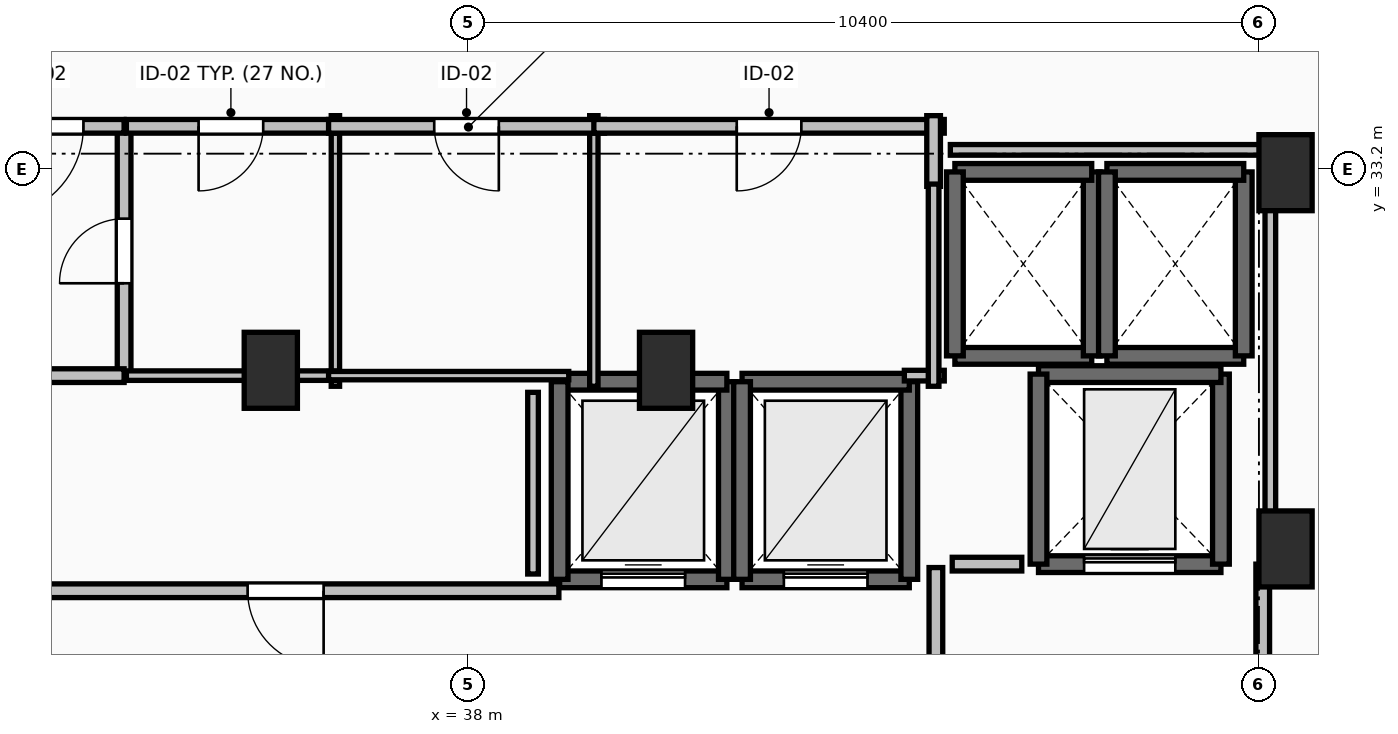
"""IFC4 building model, lengths in metres.
Left out: names, types, materials, properties, quantities, classifications, styles, units other than length and angle.
Written with IfcOpenShell. Run it as: python <this file> out.ifc"""

import sys

from ifc_helpers import new_model, si_unit, direction, frame, frame_2d, origin, origin_2d, place, context, subcontext, project, spatial, rectangle, extrude, element, fill, save


model = new_model("IFC4")
c1 = context("Model", 3, precision=1e-05, world=origin(), true_north=direction((0.0, 1.0)))
c2 = subcontext(c1, "Body", "Model", "MODEL_VIEW")
j1 = project(units=[si_unit("LENGTHUNIT", "METRE"), si_unit("PLANEANGLEUNIT", "RADIAN")], contexts=[c1])
p1 = place(None, origin())
s1 = spatial("IfcSite", under=j1, at=p1, CompositionType="ELEMENT")
p2 = place(p1, origin())
s2 = spatial("IfcBuilding", under=s1, at=p2, CompositionType="ELEMENT")
p3 = place(p2, frame((0.0, 0.0, 255.55)))
s3 = spatial("IfcBuildingStorey", under=s2, at=p3, CompositionType="ELEMENT", Elevation=255.55)
for number, where, z_axis, x_axis in (
    (1, (48.75, 33.15, 0.0), (0.0, 0.0, 1.0), (1.0, 0.0, 0.0)),
    (2, (48.75, 28.2, 0.0), (0.0, 0.0, 1.0), (1.0, 0.0, 0.0)),
    (3, (35.4, 30.55, 0.0), (0.0, 0.0, 1.0), (1.0, 0.0, 0.0)),
    (4, (40.6, 30.55, 0.0), (0.0, 0.0, 1.0), (1.0, 0.0, 0.0)),
):
    element("IfcColumn", number, at=place(p3, frame(where, z_axis=z_axis, x_axis=x_axis)), inside=s3, PredefinedType="PILASTER", context=c2, shape_type="SweptSolid", body=[
        extrude(rectangle(XDim=0.7, YDim=1.0, at=origin_2d()), origin(), (0.0, 0.0, 1.0), 3.55),
    ])
p4 = place(p3, frame((39.2, 27.8, 0.0), z_axis=(0.0, 0.0, 1.0), x_axis=(1.0, 0.0, 0.0)))
e5 = element("IfcWall", 5, at=p4, inside=s3, PredefinedType="SOLIDWALL", context=c2, shape_type="SweptSolid", body=[
    extrude(rectangle(XDim=2.2, YDim=0.22, at=frame_2d((1.1, 0.0))), origin(), (0.0, 0.0, 1.0), 3.29),
])
p5 = place(p4, frame((0.55, 0.0, 0.0)))
e6 = element("IfcOpeningElement", 6, at=p5, cuts=e5, PredefinedType="OPENING", context=c2, shape_type="SweptSolid", body=[
    extrude(rectangle(XDim=1.1, YDim=2.2, at=frame_2d((0.55, 1.1))), frame((0.0, 0.125, 0.0), z_axis=(0.0, -1.0, 0.0), x_axis=(1.0, 0.0, 0.0)), (0.0, 0.0, 1.0), 0.25),
])
p6 = place(p3, frame((41.4, 27.8, 0.0), z_axis=(0.0, 0.0, 1.0), x_axis=(0.0, 1.0, 0.0)))
e7 = element("IfcWall", 7, at=p6, inside=s3, PredefinedType="SOLIDWALL", context=c2, shape_type="SweptSolid", body=[
    extrude(rectangle(XDim=2.6, YDim=0.22, at=frame_2d((1.3, 0.0))), origin(), (0.0, 0.0, 1.0), 3.29),
])
p7 = place(p3, frame((41.4, 30.4, 0.0), z_axis=(0.0, 0.0, 1.0), x_axis=(-1.0, 0.0, 0.0)))
e8 = element("IfcWall", 8, at=p7, inside=s3, PredefinedType="SOLIDWALL", context=c2, shape_type="SweptSolid", body=[
    extrude(rectangle(XDim=2.2, YDim=0.22, at=frame_2d((1.1, 0.0))), origin(), (0.0, 0.0, 1.0), 3.29),
])
p8 = place(p3, frame((39.2, 30.4, 0.0), z_axis=(0.0, 0.0, 1.0), x_axis=(0.0, -1.0, 0.0)))
e9 = element("IfcWall", 9, at=p8, inside=s3, PredefinedType="SOLIDWALL", context=c2, shape_type="SweptSolid", body=[
    extrude(rectangle(XDim=2.6, YDim=0.22, at=frame_2d((1.3, 0.0))), origin(), (0.0, 0.0, 1.0), 3.29),
])
p9 = place(p3, frame((41.6, 27.8, 0.0), z_axis=(0.0, 0.0, 1.0), x_axis=(1.0, 0.0, 0.0)))
e10 = element("IfcWall", 10, at=p9, inside=s3, PredefinedType="SOLIDWALL", context=c2, shape_type="SweptSolid", body=[
    extrude(rectangle(XDim=2.2, YDim=0.22, at=frame_2d((1.1, 0.0))), origin(), (0.0, 0.0, 1.0), 3.29),
])
p10 = place(p9, frame((0.55, 0.0, 0.0)))
e11 = element("IfcOpeningElement", 11, at=p10, cuts=e10, PredefinedType="OPENING", context=c2, shape_type="SweptSolid", body=[
    extrude(rectangle(XDim=1.1, YDim=2.2, at=frame_2d((0.55, 1.1))), frame((0.0, 0.125, 0.0), z_axis=(0.0, -1.0, 0.0), x_axis=(1.0, 0.0, 0.0)), (0.0, 0.0, 1.0), 0.25),
])
p11 = place(p3, frame((43.8, 27.8, 0.0), z_axis=(0.0, 0.0, 1.0), x_axis=(0.0, 1.0, 0.0)))
e12 = element("IfcWall", 12, at=p11, inside=s3, PredefinedType="SOLIDWALL", context=c2, shape_type="SweptSolid", body=[
    extrude(rectangle(XDim=2.6, YDim=0.22, at=frame_2d((1.3, 0.0))), origin(), (0.0, 0.0, 1.0), 3.29),
])
p12 = place(p3, frame((43.8, 30.4, 0.0), z_axis=(0.0, 0.0, 1.0), x_axis=(-1.0, 0.0, 0.0)))
e13 = element("IfcWall", 13, at=p12, inside=s3, PredefinedType="SOLIDWALL", context=c2, shape_type="SweptSolid", body=[
    extrude(rectangle(XDim=2.2, YDim=0.22, at=frame_2d((1.1, 0.0))), origin(), (0.0, 0.0, 1.0), 3.29),
])
p13 = place(p3, frame((41.6, 30.4, 0.0), z_axis=(0.0, 0.0, 1.0), x_axis=(0.0, -1.0, 0.0)))
e14 = element("IfcWall", 14, at=p13, inside=s3, PredefinedType="SOLIDWALL", context=c2, shape_type="SweptSolid", body=[
    extrude(rectangle(XDim=2.6, YDim=0.22, at=frame_2d((1.3, 0.0))), origin(), (0.0, 0.0, 1.0), 3.29),
])
p14 = place(p3, frame((44.4, 30.74, 0.0), z_axis=(0.0, 0.0, 1.0), x_axis=(1.0, 0.0, 0.0)))
e15 = element("IfcWall", 15, at=p14, inside=s3, PredefinedType="SOLIDWALL", context=c2, shape_type="SweptSolid", body=[
    extrude(rectangle(XDim=1.8, YDim=0.22, at=frame_2d((0.9, 0.0))), origin(), (0.0, 0.0, 1.0), 3.29),
])
p15 = place(p3, frame((46.2, 30.74, 0.0), z_axis=(0.0, 0.0, 1.0), x_axis=(0.0, 1.0, 0.0)))
e16 = element("IfcWall", 16, at=p15, inside=s3, PredefinedType="SOLIDWALL", context=c2, shape_type="SweptSolid", body=[
    extrude(rectangle(XDim=2.42, YDim=0.22, at=frame_2d((1.21, 0.0))), origin(), (0.0, 0.0, 1.0), 3.29),
])
p16 = place(p3, frame((46.2, 33.16, 0.0), z_axis=(0.0, 0.0, 1.0), x_axis=(-1.0, 0.0, 0.0)))
e17 = element("IfcWall", 17, at=p16, inside=s3, PredefinedType="SOLIDWALL", context=c2, shape_type="SweptSolid", body=[
    extrude(rectangle(XDim=1.8, YDim=0.22, at=frame_2d((0.9, 0.0))), origin(), (0.0, 0.0, 1.0), 3.29),
])
p17 = place(p3, frame((44.4, 33.16, 0.0), z_axis=(0.0, 0.0, 1.0), x_axis=(0.0, -1.0, 0.0)))
e18 = element("IfcWall", 18, at=p17, inside=s3, PredefinedType="SOLIDWALL", context=c2, shape_type="SweptSolid", body=[
    extrude(rectangle(XDim=2.42, YDim=0.22, at=frame_2d((1.21, 0.0))), origin(), (0.0, 0.0, 1.0), 3.29),
])
p18 = place(p3, frame((46.4, 30.74, 0.0), z_axis=(0.0, 0.0, 1.0), x_axis=(1.0, 0.0, 0.0)))
e19 = element("IfcWall", 19, at=p18, inside=s3, PredefinedType="SOLIDWALL", context=c2, shape_type="SweptSolid", body=[
    extrude(rectangle(XDim=1.8, YDim=0.22, at=frame_2d((0.9, 0.0))), origin(), (0.0, 0.0, 1.0), 3.29),
])
p19 = place(p3, frame((48.2, 30.74, 0.0), z_axis=(0.0, 0.0, 1.0), x_axis=(0.0, 1.0, 0.0)))
e20 = element("IfcWall", 20, at=p19, inside=s3, PredefinedType="SOLIDWALL", context=c2, shape_type="SweptSolid", body=[
    extrude(rectangle(XDim=2.42, YDim=0.22, at=frame_2d((1.21, 0.0))), origin(), (0.0, 0.0, 1.0), 3.29),
])
p20 = place(p3, frame((48.2, 33.16, 0.0), z_axis=(0.0, 0.0, 1.0), x_axis=(-1.0, 0.0, 0.0)))
e21 = element("IfcWall", 21, at=p20, inside=s3, PredefinedType="SOLIDWALL", context=c2, shape_type="SweptSolid", body=[
    extrude(rectangle(XDim=1.8, YDim=0.22, at=frame_2d((0.9, 0.0))), origin(), (0.0, 0.0, 1.0), 3.29),
])
p21 = place(p3, frame((46.4, 33.16, 0.0), z_axis=(0.0, 0.0, 1.0), x_axis=(0.0, -1.0, 0.0)))
e22 = element("IfcWall", 22, at=p21, inside=s3, PredefinedType="SOLIDWALL", context=c2, shape_type="SweptSolid", body=[
    extrude(rectangle(XDim=2.42, YDim=0.22, at=frame_2d((1.21, 0.0))), origin(), (0.0, 0.0, 1.0), 3.29),
])
p22 = place(p3, frame((45.5, 28.0, 0.0), z_axis=(0.0, 0.0, 1.0), x_axis=(1.0, 0.0, 0.0)))
e23 = element("IfcWall", 23, at=p22, inside=s3, PredefinedType="SHEAR", context=c2, shape_type="SweptSolid", body=[
    extrude(rectangle(XDim=2.4, YDim=0.22, at=frame_2d((1.2, 0.0))), origin(), (0.0, 0.0, 1.0), 3.29),
])
p23 = place(p22, frame((0.6, 0.0, 0.0)))
e24 = element("IfcOpeningElement", 24, at=p23, cuts=e23, PredefinedType="OPENING", context=c2, shape_type="SweptSolid", body=[
    extrude(rectangle(XDim=1.2, YDim=2.2, at=frame_2d((0.6, 1.1))), frame((0.0, 0.125, 0.0), z_axis=(0.0, -1.0, 0.0), x_axis=(1.0, 0.0, 0.0)), (0.0, 0.0, 1.0), 0.25),
])
p24 = place(p3, frame((47.9, 28.0, 0.0), z_axis=(0.0, 0.0, 1.0), x_axis=(0.0, 1.0, 0.0)))
e25 = element("IfcWall", 25, at=p24, inside=s3, PredefinedType="SHEAR", context=c2, shape_type="SweptSolid", body=[
    extrude(rectangle(XDim=2.5, YDim=0.22, at=frame_2d((1.25, 0.0))), origin(), (0.0, 0.0, 1.0), 3.29),
])
p25 = place(p3, frame((47.9, 30.5, 0.0), z_axis=(0.0, 0.0, 1.0), x_axis=(-1.0, 0.0, 0.0)))
e26 = element("IfcWall", 26, at=p25, inside=s3, PredefinedType="SHEAR", context=c2, shape_type="SweptSolid", body=[
    extrude(rectangle(XDim=2.4, YDim=0.22, at=frame_2d((1.2, 0.0))), origin(), (0.0, 0.0, 1.0), 3.29),
])
p26 = place(p3, frame((45.5, 30.5, 0.0), z_axis=(0.0, 0.0, 1.0), x_axis=(0.0, -1.0, 0.0)))
e27 = element("IfcWall", 27, at=p26, inside=s3, PredefinedType="SHEAR", context=c2, shape_type="SweptSolid", body=[
    extrude(rectangle(XDim=2.5, YDim=0.22, at=frame_2d((1.25, 0.0))), origin(), (0.0, 0.0, 1.0), 3.29),
])
p27 = place(p3, frame((44.15, 27.955, 0.0), z_axis=(0.0, 0.0, 1.0), x_axis=(0.0, -1.0, 0.0)))
e28 = element("IfcWall", 28, at=p27, inside=s3, PredefinedType="PARTITIONING", context=c2, shape_type="SweptSolid", body=[
    extrude(rectangle(XDim=3.91, YDim=0.18, at=frame_2d((1.955, 0.0))), origin(), (0.0, 0.0, 1.0), 3.29),
])
p28 = place(p27, frame((1.355, 0.0, 0.0)))
e29 = element("IfcOpeningElement", 29, at=p28, cuts=e28, PredefinedType="OPENING", context=c2, shape_type="SweptSolid", body=[
    extrude(rectangle(XDim=1.2, YDim=2.15, at=frame_2d((0.6, 1.075))), frame((0.0, 0.105, 0.0), z_axis=(0.0, -1.0, 0.0), x_axis=(1.0, 0.0, 0.0)), (0.0, 0.0, 1.0), 0.21),
])
p29 = place(p3, frame((48.45, 23.95, 0.0), z_axis=(0.0, 0.0, 1.0), x_axis=(0.0, 1.0, 0.0)))
e30 = element("IfcWall", 30, at=p29, inside=s3, PredefinedType="PARTITIONING", context=c2, shape_type="SweptSolid", body=[
    extrude(rectangle(XDim=4.05, YDim=0.18, at=frame_2d((2.025, 0.0))), origin(), (0.0, 0.0, 1.0), 3.29),
])
p30 = place(p29, frame((1.425, 0.0, 0.0)))
e31 = element("IfcOpeningElement", 31, at=p30, cuts=e30, PredefinedType="OPENING", context=c2, shape_type="SweptSolid", body=[
    extrude(rectangle(XDim=1.2, YDim=2.15, at=frame_2d((0.6, 1.075))), frame((0.0, 0.105, 0.0), z_axis=(0.0, -1.0, 0.0), x_axis=(1.0, 0.0, 0.0)), (0.0, 0.0, 1.0), 0.21),
])
p31 = place(p3, frame((33.47, 30.48, 0.0), z_axis=(0.0, 0.0, 1.0), x_axis=(0.0, 1.0, 0.0)))
e32 = element("IfcWall", 32, at=p31, inside=s3, PredefinedType="PARTITIONING", context=c2, shape_type="SweptSolid", body=[
    extrude(rectangle(XDim=3.28, YDim=0.18, at=frame_2d((1.64, 0.0))), origin(), (0.0, 0.0, 1.0), 3.29),
])
p32 = place(p31, frame((1.215, 0.0, 0.0)))
e33 = element("IfcOpeningElement", 33, at=p32, cuts=e32, PredefinedType="OPENING", context=c2, shape_type="SweptSolid", body=[
    extrude(rectangle(XDim=0.85, YDim=2.1, at=frame_2d((0.425, 1.05))), frame((0.0, 0.105, 0.0), z_axis=(0.0, -1.0, 0.0), x_axis=(1.0, 0.0, 0.0)), (0.0, 0.0, 1.0), 0.21),
])
p33 = place(p3, frame((31.87, 30.48, 0.0), z_axis=(0.0, 0.0, 1.0), x_axis=(1.0, 0.0, 0.0)))
e34 = element("IfcWall", 34, at=p33, inside=s3, PredefinedType="PARTITIONING", context=c2, shape_type="SweptSolid", body=[
    extrude(rectangle(XDim=1.6, YDim=0.18, at=frame_2d((0.8, 0.0))), origin(), (0.0, 0.0, 1.0), 3.29),
])
p34 = place(p3, frame((33.47, 33.76, 0.0), z_axis=(0.0, 0.0, 1.0), x_axis=(-1.0, 0.0, 0.0)))
e35 = element("IfcWall", 35, at=p34, inside=s3, PredefinedType="PARTITIONING", context=c2, shape_type="SweptSolid", body=[
    extrude(rectangle(XDim=2.27, YDim=0.18, at=frame_2d((1.135, 0.0))), origin(), (0.0, 0.0, 1.0), 3.29),
])
p35 = place(p34, frame((0.535, 0.0, 0.0)))
e36 = element("IfcOpeningElement", 36, at=p35, cuts=e35, PredefinedType="OPENING", context=c2, shape_type="SweptSolid", body=[
    extrude(rectangle(XDim=1.2, YDim=2.15, at=frame_2d((0.6, 1.075))), frame((0.0, 0.105, 0.0), z_axis=(0.0, -1.0, 0.0), x_axis=(1.0, 0.0, 0.0)), (0.0, 0.0, 1.0), 0.21),
])
p36 = place(p3, frame((39.19, 27.65, 0.0), z_axis=(0.0, 0.0, 1.0), x_axis=(-1.0, 0.0, 0.0)))
e37 = element("IfcWall", 37, at=p36, inside=s3, PredefinedType="PARTITIONING", context=c2, shape_type="SweptSolid", body=[
    extrude(rectangle(XDim=7.19, YDim=0.18, at=frame_2d((3.595, 0.0))), origin(), (0.0, 0.0, 1.0), 3.29),
])
p37 = place(p36, frame((3.095, 0.0, 0.0)))
e38 = element("IfcOpeningElement", 38, at=p37, cuts=e37, PredefinedType="OPENING", context=c2, shape_type="SweptSolid", body=[
    extrude(rectangle(XDim=1.0, YDim=2.15, at=frame_2d((0.5, 1.075))), frame((0.0, 0.105, 0.0), z_axis=(0.0, -1.0, 0.0), x_axis=(1.0, 0.0, 0.0)), (0.0, 0.0, 1.0), 0.21),
])
p38 = place(p3, frame((36.25, 30.34, 0.0), z_axis=(0.0, 0.0, 1.0), x_axis=(0.0, 1.0, 0.0)))
e39 = element("IfcWall", 39, at=p38, inside=s3, PredefinedType="PARTITIONING", context=c2, shape_type="SweptSolid", body=[
    extrude(rectangle(XDim=3.56, YDim=0.11, at=frame_2d((1.78, 0.0))), origin(), (0.0, 0.0, 1.0), 2.482),
])
p39 = place(p3, frame((33.5, 30.48, 0.0), z_axis=(0.0, 0.0, 1.0), x_axis=(1.0, 0.0, 0.0)))
e40 = element("IfcWall", 40, at=p39, inside=s3, PredefinedType="PARTITIONING", context=c2, shape_type="SweptSolid", body=[
    extrude(rectangle(XDim=2.75, YDim=0.125, at=frame_2d((1.375, 0.0))), origin(), (0.0, 0.0, 1.0), 2.482),
])
p40 = place(p3, frame((36.25, 33.76, 0.0), z_axis=(0.0, 0.0, 1.0), x_axis=(-1.0, 0.0, 0.0)))
e41 = element("IfcWall", 41, at=p40, inside=s3, PredefinedType="PARTITIONING", context=c2, shape_type="SweptSolid", body=[
    extrude(rectangle(XDim=2.75, YDim=0.18, at=frame_2d((1.375, 0.0))), origin(), (0.0, 0.0, 1.0), 3.29),
])
p41 = place(p40, frame((0.95, 0.0, 0.0)))
e42 = element("IfcOpeningElement", 42, at=p41, cuts=e41, PredefinedType="OPENING", context=c2, shape_type="SweptSolid", body=[
    extrude(rectangle(XDim=0.85, YDim=2.1, at=frame_2d((0.425, 1.05))), frame((0.0, 0.105, 0.0), z_axis=(0.0, -1.0, 0.0), x_axis=(1.0, 0.0, 0.0)), (0.0, 0.0, 1.0), 0.21),
])
p42 = place(p3, frame((39.65, 30.34, 0.0), z_axis=(0.0, 0.0, 1.0), x_axis=(0.0, 1.0, 0.0)))
e43 = element("IfcWall", 43, at=p42, inside=s3, PredefinedType="PARTITIONING", context=c2, shape_type="SweptSolid", body=[
    extrude(rectangle(XDim=3.56, YDim=0.11, at=frame_2d((1.78, 0.0))), origin(), (0.0, 0.0, 1.0), 2.482),
])
p43 = place(p3, frame((36.16, 30.48, 0.0), z_axis=(0.0, 0.0, 1.0), x_axis=(1.0, 0.0, 0.0)))
e44 = element("IfcWall", 44, at=p43, inside=s3, PredefinedType="PARTITIONING", context=c2, shape_type="SweptSolid", body=[
    extrude(rectangle(XDim=3.16, YDim=0.11, at=frame_2d((1.58, 0.0))), origin(), (0.0, 0.0, 1.0), 2.482),
])
p44 = place(p3, frame((39.79, 33.76, 0.0), z_axis=(0.0, 0.0, 1.0), x_axis=(-1.0, 0.0, 0.0)))
e45 = element("IfcWall", 45, at=p44, inside=s3, PredefinedType="PARTITIONING", context=c2, shape_type="SweptSolid", body=[
    extrude(rectangle(XDim=3.63, YDim=0.18, at=frame_2d((1.815, 0.0))), origin(), (0.0, 0.0, 1.0), 3.29),
])
p45 = place(p44, frame((1.39, 0.0, 0.0)))
e46 = element("IfcOpeningElement", 46, at=p45, cuts=e45, PredefinedType="OPENING", context=c2, shape_type="SweptSolid", body=[
    extrude(rectangle(XDim=0.85, YDim=2.1, at=frame_2d((0.425, 1.05))), frame((0.0, 0.105, 0.0), z_axis=(0.0, -1.0, 0.0), x_axis=(1.0, 0.0, 0.0)), (0.0, 0.0, 1.0), 0.21),
])
p46 = place(p3, frame((44.26, 33.76, 0.0), z_axis=(0.0, 0.0, 1.0), x_axis=(-1.0, 0.0, 0.0)))
e47 = element("IfcWall", 47, at=p46, inside=s3, PredefinedType="PARTITIONING", context=c2, shape_type="SweptSolid", body=[
    extrude(rectangle(XDim=4.61, YDim=0.18, at=frame_2d((2.305, 0.0))), origin(), (0.0, 0.0, 1.0), 3.29),
])
p47 = place(p46, frame((1.88, 0.0, 0.0)))
e48 = element("IfcOpeningElement", 48, at=p47, cuts=e47, PredefinedType="OPENING", context=c2, shape_type="SweptSolid", body=[
    extrude(rectangle(XDim=0.85, YDim=2.1, at=frame_2d((0.425, 1.05))), frame((0.0, 0.105, 0.0), z_axis=(0.0, -1.0, 0.0), x_axis=(1.0, 0.0, 0.0)), (0.0, 0.0, 1.0), 0.21),
])
p48 = place(p3, frame((44.12, 32.97, 0.0), z_axis=(0.0, 0.0, 1.0), x_axis=(0.0, 1.0, 0.0)))
e49 = element("IfcWall", 49, at=p48, inside=s3, PredefinedType="PARTITIONING", context=c2, shape_type="SweptSolid", body=[
    extrude(rectangle(XDim=0.93, YDim=0.18, at=frame_2d((0.465, 0.0))), origin(), (0.0, 0.0, 1.0), 3.29),
])
p49 = place(p3, frame((45.28, 28.0, 0.0), z_axis=(0.0, 0.0, 1.0), x_axis=(-1.0, 0.0, 0.0)))
e50 = element("IfcWall", 50, at=p49, inside=s3, PredefinedType="PARTITIONING", context=c2, shape_type="SweptSolid", body=[
    extrude(rectangle(XDim=0.915, YDim=0.18, at=frame_2d((0.458, 0.0))), origin(), (0.0, 0.0, 1.0), 3.29),
])
p50 = place(p3, frame((43.735, 30.48, 0.0), z_axis=(0.0, 0.0, 1.0), x_axis=(1.0, 0.0, 0.0)))
e51 = element("IfcWall", 51, at=p50, inside=s3, PredefinedType="PARTITIONING", context=c2, shape_type="SweptSolid", body=[
    extrude(rectangle(XDim=0.525, YDim=0.14, at=frame_2d((0.262, 0.0))), origin(), (0.0, 0.0, 1.0), 3.29),
])
p51 = place(p3, frame((44.12, 30.34, 0.0), z_axis=(0.0, 0.0, 1.0), x_axis=(0.0, 1.0, 0.0)))
e52 = element("IfcWall", 52, at=p51, inside=s3, PredefinedType="PARTITIONING", context=c2, shape_type="SweptSolid", body=[
    extrude(rectangle(XDim=2.66, YDim=0.14, at=frame_2d((1.33, 0.0))), origin(), (0.0, 0.0, 1.0), 3.29),
])
p52 = place(p3, frame((38.85, 27.87, 0.0), z_axis=(0.0, 0.0, 1.0), x_axis=(0.0, 1.0, 0.0)))
e53 = element("IfcWall", 53, at=p52, inside=s3, PredefinedType="PARTITIONING", context=c2, shape_type="SweptSolid", body=[
    extrude(rectangle(XDim=2.39, YDim=0.14, at=frame_2d((1.195, 0.0))), origin(), (0.0, 0.0, 1.0), 3.29),
])
p53 = place(p3, frame((48.55, 28.196, 0.0), z_axis=(0.0, 0.0, 1.0), x_axis=(0.0, 1.0, 0.0)))
e54 = element("IfcWall", 54, at=p53, inside=s3, PredefinedType="PARTITIONING", context=c2, shape_type="SweptSolid", body=[
    extrude(rectangle(XDim=5.254, YDim=0.14, at=frame_2d((2.627, 0.0))), origin(), (0.0, 0.0, 1.0), 2.482),
])
p54 = place(p3, frame((48.55, 33.45, 0.0), z_axis=(0.0, 0.0, 1.0), x_axis=(-1.0, 0.0, 0.0)))
e55 = element("IfcWall", 55, at=p54, inside=s3, PredefinedType="PARTITIONING", context=c2, shape_type="SweptSolid", body=[
    extrude(rectangle(XDim=4.21, YDim=0.14, at=frame_2d((2.105, 0.0))), origin(), (0.0, 0.0, 1.0), 2.482),
])
p55 = place(p5, origin())
e56 = element("IfcDoor", 56, at=p55, inside=s3, OperationType="SLIDING_TO_LEFT", PredefinedType="DOOR", context=c2, shape_type="SweptSolid", body=[
    extrude(rectangle(XDim=1.1, YDim=2.2, at=frame_2d((0.55, 1.1))), frame((0.0, 0.025, 0.0), z_axis=(0.0, -1.0, 0.0), x_axis=(1.0, 0.0, 0.0)), (0.0, 0.0, 1.0), 0.05),
])
fill(e6, e56)
p56 = place(p10, origin())
e57 = element("IfcDoor", 57, at=p56, inside=s3, OperationType="SLIDING_TO_LEFT", PredefinedType="DOOR", context=c2, shape_type="SweptSolid", body=[
    extrude(rectangle(XDim=1.1, YDim=2.2, at=frame_2d((0.55, 1.1))), frame((0.0, 0.025, 0.0), z_axis=(0.0, -1.0, 0.0), x_axis=(1.0, 0.0, 0.0)), (0.0, 0.0, 1.0), 0.05),
])
fill(e11, e57)
p57 = place(p23, origin())
e58 = element("IfcDoor", 58, at=p57, inside=s3, OperationType="SLIDING_TO_LEFT", PredefinedType="DOOR", context=c2, shape_type="SweptSolid", body=[
    extrude(rectangle(XDim=1.2, YDim=2.2, at=frame_2d((0.6, 1.1))), frame((0.0, 0.025, 0.0), z_axis=(0.0, -1.0, 0.0), x_axis=(1.0, 0.0, 0.0)), (0.0, 0.0, 1.0), 0.05),
])
fill(e24, e58)
p58 = place(p32, origin())
e59 = element("IfcDoor", 59, at=p58, inside=s3, OperationType="SINGLE_SWING_LEFT", PredefinedType="DOOR", context=c2, shape_type="SweptSolid", body=[
    extrude(rectangle(XDim=0.85, YDim=2.1, at=frame_2d((0.425, 1.05))), frame((0.0, 0.025, 0.0), z_axis=(0.0, -1.0, 0.0), x_axis=(1.0, 0.0, 0.0)), (0.0, 0.0, 1.0), 0.05),
])
fill(e33, e59)
p59 = place(p35, origin())
e60 = element("IfcDoor", 60, at=p59, inside=s3, OperationType="SINGLE_SWING_RIGHT", PredefinedType="DOOR", context=c2, shape_type="SweptSolid", body=[
    extrude(rectangle(XDim=1.2, YDim=2.15, at=frame_2d((0.6, 1.075))), frame((0.0, 0.025, 0.0), z_axis=(0.0, -1.0, 0.0), x_axis=(1.0, 0.0, 0.0)), (0.0, 0.0, 1.0), 0.05),
])
fill(e36, e60)
p60 = place(p37, origin())
e61 = element("IfcDoor", 61, at=p60, inside=s3, OperationType="SINGLE_SWING_LEFT", PredefinedType="DOOR", context=c2, shape_type="SweptSolid", body=[
    extrude(rectangle(XDim=1.0, YDim=2.15, at=frame_2d((0.5, 1.075))), frame((0.0, 0.025, 0.0), z_axis=(0.0, -1.0, 0.0), x_axis=(1.0, 0.0, 0.0)), (0.0, 0.0, 1.0), 0.05),
])
fill(e38, e61)
p61 = place(p41, origin())
e62 = element("IfcDoor", 62, at=p61, inside=s3, OperationType="SINGLE_SWING_RIGHT", PredefinedType="DOOR", context=c2, shape_type="SweptSolid", body=[
    extrude(rectangle(XDim=0.85, YDim=2.1, at=frame_2d((0.425, 1.05))), frame((0.0, 0.025, 0.0), z_axis=(0.0, -1.0, 0.0), x_axis=(1.0, 0.0, 0.0)), (0.0, 0.0, 1.0), 0.05),
])
fill(e42, e62)
p62 = place(p45, origin())
e63 = element("IfcDoor", 63, at=p62, inside=s3, OperationType="SINGLE_SWING_LEFT", PredefinedType="DOOR", context=c2, shape_type="SweptSolid", body=[
    extrude(rectangle(XDim=0.85, YDim=2.1, at=frame_2d((0.425, 1.05))), frame((0.0, 0.025, 0.0), z_axis=(0.0, -1.0, 0.0), x_axis=(1.0, 0.0, 0.0)), (0.0, 0.0, 1.0), 0.05),
])
fill(e46, e63)
p63 = place(p47, origin())
e64 = element("IfcDoor", 64, at=p63, inside=s3, OperationType="SINGLE_SWING_RIGHT", PredefinedType="DOOR", context=c2, shape_type="SweptSolid", body=[
    extrude(rectangle(XDim=0.85, YDim=2.1, at=frame_2d((0.425, 1.05))), frame((0.0, 0.025, 0.0), z_axis=(0.0, -1.0, 0.0), x_axis=(1.0, 0.0, 0.0)), (0.0, 0.0, 1.0), 0.05),
])
fill(e48, e64)
save(model, sys.argv[1])
